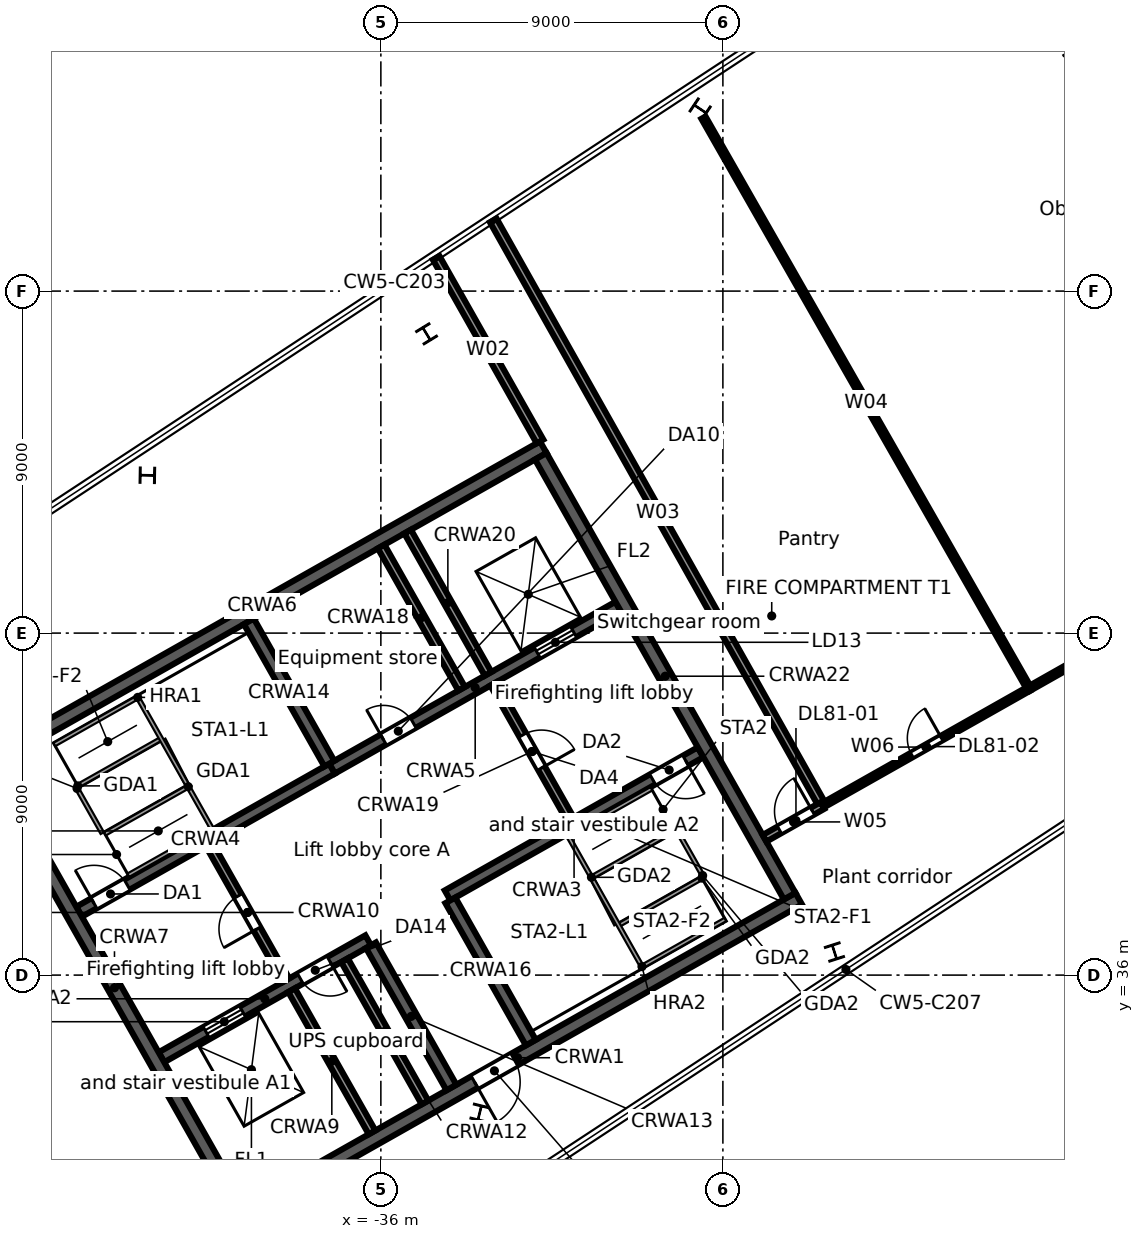
"""IFC4 building model, lengths in metres.
Left out: names, types, materials, properties, quantities, classifications, styles, units other than length and angle.
Written with IfcOpenShell. Run it as: python <this file> out.ifc"""

import sys

from ifc_helpers import new_model, si_unit, direction, frame, frame_2d, origin, origin_2d, place, context, subcontext, project, spatial, rectangle, i_section, extrude, element, fill, save


model = new_model("IFC4")
c1 = context("Model", 3, precision=1e-05, world=origin(), true_north=direction((0.0, 1.0)))
c2 = subcontext(c1, "Body", "Model", "MODEL_VIEW")
j1 = project(units=[si_unit("LENGTHUNIT", "METRE"), si_unit("PLANEANGLEUNIT", "RADIAN")], contexts=[c1])
p1 = place(None, origin())
s1 = spatial("IfcSite", under=j1, at=p1, CompositionType="ELEMENT")
p2 = place(p1, origin())
s2 = spatial("IfcBuilding", under=s1, at=p2, CompositionType="ELEMENT")
p3 = place(p2, frame((0.0, 0.0, 357.7)))
s3 = spatial("IfcBuildingStorey", under=s2, at=p3, CompositionType="ELEMENT", Elevation=357.7)
for number, where, z_axis, x_axis in (
    (1, (-17.957, 60.462, 0.0), (0.0, 0.0, 1.0), (0.87, 0.492, 0.0)),
    (2, (-27.598, 58.793, 0.0), (0.0, 0.0, 1.0), (0.558, 0.83, 0.0)),
    (3, (-34.798, 52.875, 0.0), (0.0, 0.0, 1.0), (0.853, 0.521, 0.0)),
):
    element("IfcColumn", number, at=place(p3, frame(where, z_axis=z_axis, x_axis=x_axis)), inside=s3, PredefinedType="COLUMN", context=c2, shape_type="SweptSolid", body=[
        extrude(i_section(OverallWidth=0.4, OverallDepth=0.4, WebThickness=0.013, FlangeThickness=0.021, FilletRadius=0.022, at=origin_2d()), origin(), (0.0, 0.0, 1.0), 3.3),
    ])
p4 = place(p3, frame((-42.144, 49.153, 0.0), z_axis=(0.0, 0.0, 1.0), x_axis=(0.017539659542, 0.999846168339, 0.0)))
e4 = element("IfcColumn", 4, at=p4, inside=s3, PredefinedType="COLUMN", context=c2, shape_type="SweptSolid", body=[
    extrude(i_section(OverallWidth=0.4, OverallDepth=0.4, WebThickness=0.013, FlangeThickness=0.021, FilletRadius=0.022, at=origin_2d()), origin(), (0.0, 0.0, 1.0), 3.6),
])
for number, where, z_axis, x_axis in (
    (5, (-33.4, 32.374, 0.0), (0.0, 0.0, 1.0), (-0.971, 0.239, 0.0)),
    (6, (-24.065, 36.607, 0.0), (0.0, 0.0, 1.0), (-0.952, -0.307, 0.0)),
):
    element("IfcColumn", number, at=place(p3, frame(where, z_axis=z_axis, x_axis=x_axis)), inside=s3, PredefinedType="COLUMN", context=c2, shape_type="SweptSolid", body=[
        extrude(i_section(OverallWidth=0.4, OverallDepth=0.4, WebThickness=0.013, FlangeThickness=0.021, FilletRadius=0.022, at=origin_2d()), origin(), (0.0, 0.0, 1.0), 3.3),
    ])
p5 = place(p3, frame((-44.119, 26.51, 0.0), z_axis=(0.0, 0.0, 1.0), x_axis=(-0.857172484352, 0.515029447769, 0.0)))
e7 = element("IfcWall", 7, at=p5, inside=s3, PredefinedType="STANDARD", context=c2, shape_type="SweptSolid", body=[
    extrude(rectangle(XDim=17.084, YDim=0.2, at=frame_2d((8.542, 0.0))), origin(), (0.0, 0.0, 1.0), 3.3),
])
p6 = place(p3, frame((-39.801, 29.64, 0.0), z_axis=(0.0, 0.0, 1.0), x_axis=(0.870359753402, 0.492416388494, 0.0)))
e8 = element("IfcWall", 8, at=p6, inside=s3, PredefinedType="SOLIDWALL", context=c2, shape_type="SweptSolid", body=[
    extrude(rectangle(XDim=17.0, YDim=0.35, at=frame_2d((8.5, 0.0))), origin(), (0.0, 0.0, 1.0), 3.3),
])
p7 = place(p6, frame((7.2, 0.0, 0.0)))
e9 = element("IfcOpeningElement", 9, at=p7, cuts=e8, PredefinedType="OPENING", context=c2, shape_type="SweptSolid", body=[
    extrude(rectangle(XDim=1.2, YDim=2.1, at=frame_2d((0.6, 1.05))), frame((0.0, 0.185, 0.0), z_axis=(0.0, -1.0, 0.0), x_axis=(1.0, 0.0, 0.0)), (0.0, 0.0, 1.0), 0.37),
])
p8 = place(p3, frame((-41.774, 33.838, 0.0), z_axis=(0.0, 0.0, 1.0), x_axis=(0.870355415866, 0.492424055132, 0.0)))
e10 = element("IfcWall", 10, at=p8, inside=s3, PredefinedType="SOLIDWALL", context=c2, shape_type="SweptSolid", body=[
    extrude(rectangle(XDim=6.25, YDim=0.3, at=frame_2d((3.125, 0.0))), origin(), (0.0, 0.0, 1.0), 3.3),
])
p9 = place(p8, frame((1.35, 0.0, 0.0)))
e11 = element("IfcOpeningElement", 11, at=p9, cuts=e10, PredefinedType="OPENING", context=c2, shape_type="SweptSolid", body=[
    extrude(rectangle(XDim=1.1, YDim=2.1, at=frame_2d((0.55, 1.05))), frame((0.0, 0.16, 0.0), z_axis=(0.0, -1.0, 0.0), x_axis=(1.0, 0.0, 0.0)), (0.0, 0.0, 1.0), 0.32),
])
p10 = place(p8, frame((4.2, 0.0, 0.0)))
e12 = element("IfcOpeningElement", 12, at=p10, cuts=e10, PredefinedType="OPENING", context=c2, shape_type="SweptSolid", body=[
    extrude(rectangle(XDim=0.9, YDim=2.1, at=frame_2d((0.45, 1.05))), frame((0.0, 0.16, 0.0), z_axis=(0.0, -1.0, 0.0), x_axis=(1.0, 0.0, 0.0)), (0.0, 0.0, 1.0), 0.32),
])
p11 = place(p3, frame((-34.245, 38.097, 0.0), z_axis=(0.0, 0.0, 1.0), x_axis=(0.870352347706, 0.49242947804, 0.0)))
e13 = element("IfcWall", 13, at=p11, inside=s3, PredefinedType="SOLIDWALL", context=c2, shape_type="SweptSolid", body=[
    extrude(rectangle(XDim=7.65, YDim=0.3, at=frame_2d((3.825, 0.0))), origin(), (0.0, 0.0, 1.0), 3.3),
])
p12 = place(p11, frame((6.2, 0.0, 0.0)))
e14 = element("IfcOpeningElement", 14, at=p12, cuts=e13, PredefinedType="OPENING", context=c2, shape_type="SweptSolid", body=[
    extrude(rectangle(XDim=1.0, YDim=2.1, at=frame_2d((0.5, 1.05))), frame((0.0, 0.16, 0.0), z_axis=(0.0, -1.0, 0.0), x_axis=(1.0, 0.0, 0.0)), (0.0, 0.0, 1.0), 0.32),
])
p13 = place(p3, frame((-43.94, 37.667, 0.0), z_axis=(0.0, 0.0, 1.0), x_axis=(0.870352347706, 0.49242947804, 0.0)))
e15 = element("IfcWall", 15, at=p13, inside=s3, PredefinedType="SOLIDWALL", context=c2, shape_type="SweptSolid", body=[
    extrude(rectangle(XDim=7.65, YDim=0.3, at=frame_2d((3.825, 0.0))), origin(), (0.0, 0.0, 1.0), 3.3),
])
p14 = place(p13, frame((0.45, 0.0, 0.0)))
e16 = element("IfcOpeningElement", 16, at=p14, cuts=e15, PredefinedType="OPENING", context=c2, shape_type="SweptSolid", body=[
    extrude(rectangle(XDim=1.0, YDim=2.1, at=frame_2d((0.5, 1.05))), frame((0.0, 0.16, 0.0), z_axis=(0.0, -1.0, 0.0), x_axis=(1.0, 0.0, 0.0)), (0.0, 0.0, 1.0), 0.32),
])
p15 = place(p3, frame((-37.282, 41.435, 0.0), z_axis=(0.0, 0.0, 1.0), x_axis=(0.870364588774, 0.492407841741, 0.0)))
e17 = element("IfcWall", 17, at=p15, inside=s3, PredefinedType="SOLIDWALL", context=c2, shape_type="SweptSolid", body=[
    extrude(rectangle(XDim=8.65, YDim=0.3, at=frame_2d((4.325, 0.0))), origin(), (0.0, 0.0, 1.0), 3.3),
])
p16 = place(p15, frame((6.2, 0.0, 0.0)))
e18 = element("IfcOpeningElement", 18, at=p16, cuts=e17, PredefinedType="OPENING", context=c2, shape_type="SweptSolid", body=[
    extrude(rectangle(XDim=1.1, YDim=2.1, at=frame_2d((0.55, 1.05))), frame((0.0, 0.16, 0.0), z_axis=(0.0, -1.0, 0.0), x_axis=(1.0, 0.0, 0.0)), (0.0, 0.0, 1.0), 0.32),
])
p17 = place(p15, frame((1.55, 0.0, 0.0)))
e19 = element("IfcOpeningElement", 19, at=p17, cuts=e17, PredefinedType="OPENING", context=c2, shape_type="SweptSolid", body=[
    extrude(rectangle(XDim=0.9, YDim=2.1, at=frame_2d((0.45, 1.05))), frame((0.0, 0.16, 0.0), z_axis=(0.0, -1.0, 0.0), x_axis=(1.0, 0.0, 0.0)), (0.0, 0.0, 1.0), 0.32),
])
p18 = place(p3, frame((-46.522, 41.521, 0.0), z_axis=(0.0, 0.0, 1.0), x_axis=(0.870359753402, 0.492416388494, 0.0)))
e20 = element("IfcWall", 20, at=p18, inside=s3, PredefinedType="SOLIDWALL", context=c2, shape_type="SweptSolid", body=[
    extrude(rectangle(XDim=17.0, YDim=0.35, at=frame_2d((8.5, 0.0))), origin(), (0.0, 0.0, 1.0), 3.3),
])
p19 = place(p3, frame((-46.284, 41.454, 0.0), z_axis=(0.0, 0.0, 1.0), x_axis=(0.492429810477, -0.870352159619, 0.0)))
e21 = element("IfcWall", 21, at=p19, inside=s3, PredefinedType="SOLIDWALL", context=c2, shape_type="SweptSolid", body=[
    extrude(rectangle(XDim=13.3, YDim=0.35, at=frame_2d((6.65, 0.0))), origin(), (0.0, 0.0, 1.0), 3.3),
])
p20 = place(p3, frame((-38.349, 35.603, 0.0), z_axis=(0.0, 0.0, 1.0), x_axis=(0.492410799949, -0.870362915164, 0.0)))
e22 = element("IfcWall", 22, at=p20, inside=s3, PredefinedType="SOLIDWALL", context=c2, shape_type="SweptSolid", body=[
    extrude(rectangle(XDim=4.3, YDim=0.2, at=frame_2d((2.15, 0.0))), origin(), (0.0, 0.0, 1.0), 3.3),
])
p21 = place(p3, frame((-40.516, 39.433, 0.0), z_axis=(0.0, 0.0, 1.0), x_axis=(0.492453559952, -0.87033872216, 0.0)))
e23 = element("IfcWall", 23, at=p21, inside=s3, PredefinedType="PARTITIONING", context=c2, shape_type="SweptSolid", body=[
    extrude(rectangle(XDim=4.1, YDim=0.2, at=frame_2d((2.05, 0.0))), origin(), (0.0, 0.0, 1.0), 3.3),
])
p22 = place(p21, frame((1.55, 0.0, 0.0)))
e24 = element("IfcOpeningElement", 24, at=p22, cuts=e23, PredefinedType="OPENING", context=c2, shape_type="SweptSolid", body=[
    extrude(rectangle(XDim=1.0, YDim=2.1, at=frame_2d((0.5, 1.05))), frame((0.0, 0.11, 0.0), z_axis=(0.0, -1.0, 0.0), x_axis=(1.0, 0.0, 0.0)), (0.0, 0.0, 1.0), 0.22),
])
p23 = place(p3, frame((-36.956, 36.391, 0.0), z_axis=(0.0, 0.0, 1.0), x_axis=(0.492410799949, -0.870362915164, 0.0)))
e25 = element("IfcWall", 25, at=p23, inside=s3, PredefinedType="SOLIDWALL", context=c2, shape_type="SweptSolid", body=[
    extrude(rectangle(XDim=4.3, YDim=0.2, at=frame_2d((2.15, 0.0))), origin(), (0.0, 0.0, 1.0), 3.3),
])
p24 = place(p3, frame((-36.26, 36.785, 0.0), z_axis=(0.0, 0.0, 1.0), x_axis=(0.492435133428, -0.870349147967, 0.0)))
e26 = element("IfcWall", 26, at=p24, inside=s3, PredefinedType="SOLIDWALL", context=c2, shape_type="SweptSolid", body=[
    extrude(rectangle(XDim=4.3, YDim=0.3, at=frame_2d((2.15, 0.0))), origin(), (0.0, 0.0, 1.0), 3.3),
])
p25 = place(p3, frame((-39.473, 45.308, 0.0), z_axis=(0.0, 0.0, 1.0), x_axis=(0.492410799949, -0.870362915164, 0.0)))
e27 = element("IfcWall", 27, at=p25, inside=s3, PredefinedType="SOLIDWALL", context=c2, shape_type="SweptSolid", body=[
    extrude(rectangle(XDim=4.3, YDim=0.3, at=frame_2d((2.15, 0.0))), origin(), (0.0, 0.0, 1.0), 3.3),
])
p26 = place(p3, frame((-34.171, 37.967, 0.0), z_axis=(0.0, 0.0, 1.0), x_axis=(0.492435133428, -0.870349147967, 0.0)))
e28 = element("IfcWall", 28, at=p26, inside=s3, PredefinedType="SOLIDWALL", context=c2, shape_type="SweptSolid", body=[
    extrude(rectangle(XDim=4.3, YDim=0.3, at=frame_2d((2.15, 0.0))), origin(), (0.0, 0.0, 1.0), 3.3),
])
p27 = place(p3, frame((-35.992, 47.277, 0.0), z_axis=(0.0, 0.0, 1.0), x_axis=(0.492410799949, -0.870362915164, 0.0)))
e29 = element("IfcWall", 29, at=p27, inside=s3, PredefinedType="SOLIDWALL", context=c2, shape_type="SweptSolid", body=[
    extrude(rectangle(XDim=4.3, YDim=0.2, at=frame_2d((2.15, 0.0))), origin(), (0.0, 0.0, 1.0), 3.3),
])
p28 = place(p3, frame((-33.031, 43.667, 0.0), z_axis=(0.0, 0.0, 1.0), x_axis=(0.492408451753, -0.87036424366, 0.0)))
e30 = element("IfcWall", 30, at=p28, inside=s3, PredefinedType="PARTITIONING", context=c2, shape_type="SweptSolid", body=[
    extrude(rectangle(XDim=4.1, YDim=0.2, at=frame_2d((2.05, 0.0))), origin(), (0.0, 0.0, 1.0), 3.3),
])
p29 = place(p28, frame((1.55, 0.0, 0.0)))
e31 = element("IfcOpeningElement", 31, at=p29, cuts=e30, PredefinedType="OPENING", context=c2, shape_type="SweptSolid", body=[
    extrude(rectangle(XDim=1.0, YDim=2.1, at=frame_2d((0.5, 1.05))), frame((0.0, 0.11, 0.0), z_axis=(0.0, -1.0, 0.0), x_axis=(1.0, 0.0, 0.0)), (0.0, 0.0, 1.0), 0.22),
])
p30 = place(p3, frame((-35.296, 47.671, 0.0), z_axis=(0.0, 0.0, 1.0), x_axis=(0.492435133428, -0.870349147967, 0.0)))
e32 = element("IfcWall", 32, at=p30, inside=s3, PredefinedType="SOLIDWALL", context=c2, shape_type="SweptSolid", body=[
    extrude(rectangle(XDim=4.3, YDim=0.2, at=frame_2d((2.15, 0.0))), origin(), (0.0, 0.0, 1.0), 3.3),
])
p31 = place(p3, frame((-31.792, 49.653, 0.0), z_axis=(0.0, 0.0, 1.0), x_axis=(0.492421943245, -0.870356610712, 0.0)))
e33 = element("IfcWall", 33, at=p31, inside=s3, PredefinedType="SOLIDWALL", context=c2, shape_type="SweptSolid", body=[
    extrude(rectangle(XDim=13.3, YDim=0.35, at=frame_2d((6.65, 0.0))), origin(), (0.0, 0.0, 1.0), 3.3),
])
p32 = place(p3, frame((-34.544, 54.873, 0.0), z_axis=(0.0, 0.0, 1.0), x_axis=(0.492390708412, -0.870374281714, 0.0)))
e34 = element("IfcWall", 34, at=p32, inside=s3, PredefinedType="PARTITIONING", context=c2, shape_type="SweptSolid", body=[
    extrude(rectangle(XDim=5.548, YDim=0.2, at=frame_2d((2.774, 0.0))), origin(), (0.0, 0.0, 1.0), 2.18),
])
p33 = place(p3, frame((-33.042, 55.86, 0.0), z_axis=(0.0, 0.0, 1.0), x_axis=(0.490288138745, -0.871560405828, 0.0)))
e35 = element("IfcWall", 35, at=p33, inside=s3, PredefinedType="PARTITIONING", context=c2, shape_type="SweptSolid", body=[
    extrude(rectangle(XDim=17.667, YDim=0.2, at=frame_2d((8.834, 0.0))), origin(), (0.0, 0.0, 1.0), 2.18),
])
p34 = place(p3, frame((-27.511, 58.564, 0.0), z_axis=(0.0, 0.0, 1.0), x_axis=(0.495459338806, -0.868631132063, 0.0)))
e36 = element("IfcWall", 36, at=p34, inside=s3, PredefinedType="PARTITIONING", context=c2, shape_type="SweptSolid", body=[
    extrude(rectangle(XDim=17.297, YDim=0.125, at=frame_2d((8.648, 0.0))), origin(), (0.0, 0.0, 1.0), 3.3),
])
p35 = place(p3, frame((-25.904, 39.6, 0.0), z_axis=(0.0, 0.0, 1.0), x_axis=(0.870482323294, 0.492199679838, 0.0)))
e37 = element("IfcWall", 37, at=p35, inside=s3, PredefinedType="PARTITIONING", context=c2, shape_type="SweptSolid", body=[
    extrude(rectangle(XDim=1.751, YDim=0.2, at=frame_2d((0.875, 0.0))), origin(), (0.0, 0.0, 1.0), 3.3),
])
p36 = place(p35, frame((0.45, 0.0, 0.0)))
e38 = element("IfcOpeningElement", 38, at=p36, cuts=e37, PredefinedType="OPENING", context=c2, shape_type="SweptSolid", body=[
    extrude(rectangle(XDim=1.0, YDim=2.1, at=frame_2d((0.5, 1.05))), frame((0.0, 0.11, 0.0), z_axis=(0.0, -1.0, 0.0), x_axis=(1.0, 0.0, 0.0)), (0.0, 0.0, 1.0), 0.22),
])
p37 = place(p3, frame((-24.38, 40.462, 0.0), z_axis=(0.0, 0.0, 1.0), x_axis=(0.87036048388, 0.492415097353, 0.0)))
e39 = element("IfcWall", 39, at=p37, inside=s3, PredefinedType="PARTITIONING", context=c2, shape_type="SweptSolid", body=[
    extrude(rectangle(XDim=6.249, YDim=0.125, at=frame_2d((3.125, 0.0))), origin(), (0.0, 0.0, 1.0), 3.3),
])
p38 = place(p37, frame((2.7, 0.0, 0.0)))
e40 = element("IfcOpeningElement", 40, at=p38, cuts=e39, PredefinedType="OPENING", context=c2, shape_type="SweptSolid", body=[
    extrude(rectangle(XDim=0.9, YDim=2.1, at=frame_2d((0.45, 1.05))), frame((0.0, 0.073, 0.0), z_axis=(0.0, -1.0, 0.0), x_axis=(1.0, 0.0, 0.0)), (0.0, 0.0, 1.0), 0.145),
])
p39 = place(p3, frame((-18.941, 43.539, 0.0), z_axis=(0.0, 0.0, 1.0), x_axis=(0.870355301806, 0.492424256733, 0.0)))
e41 = element("IfcWall", 41, at=p39, inside=s3, PredefinedType="PARTITIONING", context=c2, shape_type="SweptSolid", body=[
    extrude(rectangle(XDim=13.216, YDim=0.125, at=frame_2d((6.608, 0.0))), origin(), (0.0, 0.0, 1.0), 2.68),
])
p40 = place(p39, frame((5.7, 0.0, 0.0)))
e42 = element("IfcOpeningElement", 42, at=p40, cuts=e41, PredefinedType="OPENING", context=c2, shape_type="SweptSolid", body=[
    extrude(rectangle(XDim=1.8, YDim=2.1, at=frame_2d((0.9, 1.05))), frame((0.0, 0.073, 0.0), z_axis=(0.0, -1.0, 0.0), x_axis=(1.0, 0.0, 0.0)), (0.0, 0.0, 1.0), 0.145),
])
p41 = place(p16, origin())
e43 = element("IfcDoor", 43, at=p41, inside=s3, OperationType="DOUBLE_DOOR_SLIDING", PredefinedType="DOOR", context=c2, shape_type="SweptSolid", body=[
    extrude(rectangle(XDim=1.1, YDim=2.1, at=frame_2d((0.55, 1.05))), frame((0.0, 0.025, 0.0), z_axis=(0.0, -1.0, 0.0), x_axis=(1.0, 0.0, 0.0)), (0.0, 0.0, 1.0), 0.05),
])
fill(e18, e43)
p42 = place(p9, origin())
e44 = element("IfcDoor", 44, at=p42, inside=s3, OperationType="DOUBLE_DOOR_SLIDING", PredefinedType="DOOR", context=c2, shape_type="SweptSolid", body=[
    extrude(rectangle(XDim=1.1, YDim=2.1, at=frame_2d((0.55, 1.05))), frame((0.0, 0.025, 0.0), z_axis=(0.0, -1.0, 0.0), x_axis=(1.0, 0.0, 0.0)), (0.0, 0.0, 1.0), 0.05),
])
fill(e11, e44)
p43 = place(p14, origin())
e45 = element("IfcDoor", 45, at=p43, inside=s3, OperationType="SINGLE_SWING_LEFT", PredefinedType="DOOR", context=c2, shape_type="SweptSolid", body=[
    extrude(rectangle(XDim=1.0, YDim=2.1, at=frame_2d((0.5, 1.05))), frame((0.0, 0.025, 0.0), z_axis=(0.0, -1.0, 0.0), x_axis=(1.0, 0.0, 0.0)), (0.0, 0.0, 1.0), 0.05),
])
fill(e16, e45)
p44 = place(p12, frame((1.0, 0.0, 0.0), z_axis=(0.0, 0.0, 1.0), x_axis=(-1.0, 0.0, 0.0)))
e46 = element("IfcDoor", 46, at=p44, inside=s3, OperationType="SINGLE_SWING_LEFT", PredefinedType="DOOR", context=c2, shape_type="SweptSolid", body=[
    extrude(rectangle(XDim=1.0, YDim=2.1, at=frame_2d((0.5, 1.05))), frame((0.0, 0.025, 0.0), z_axis=(0.0, -1.0, 0.0), x_axis=(1.0, 0.0, 0.0)), (0.0, 0.0, 1.0), 0.05),
])
fill(e14, e46)
p45 = place(p22, frame((1.0, 0.0, 0.0), z_axis=(0.0, 0.0, 1.0), x_axis=(-1.0, 0.0, 0.0)))
e47 = element("IfcDoor", 47, at=p45, inside=s3, OperationType="SINGLE_SWING_LEFT", PredefinedType="DOOR", context=c2, shape_type="SweptSolid", body=[
    extrude(rectangle(XDim=1.0, YDim=2.1, at=frame_2d((0.5, 1.05))), frame((0.0, 0.025, 0.0), z_axis=(0.0, -1.0, 0.0), x_axis=(1.0, 0.0, 0.0)), (0.0, 0.0, 1.0), 0.05),
])
fill(e24, e47)
p46 = place(p29, origin())
e48 = element("IfcDoor", 48, at=p46, inside=s3, OperationType="SINGLE_SWING_RIGHT", PredefinedType="DOOR", context=c2, shape_type="SweptSolid", body=[
    extrude(rectangle(XDim=1.0, YDim=2.1, at=frame_2d((0.5, 1.05))), frame((0.0, 0.025, 0.0), z_axis=(0.0, -1.0, 0.0), x_axis=(1.0, 0.0, 0.0)), (0.0, 0.0, 1.0), 0.05),
])
fill(e31, e48)
p47 = place(p7, frame((1.2, 0.0, 0.0), z_axis=(0.0, 0.0, 1.0), x_axis=(-1.0, 0.0, 0.0)))
e49 = element("IfcDoor", 49, at=p47, inside=s3, OperationType="SINGLE_SWING_RIGHT", PredefinedType="DOOR", context=c2, shape_type="SweptSolid", body=[
    extrude(rectangle(XDim=1.2, YDim=2.1, at=frame_2d((0.6, 1.05))), frame((0.0, 0.025, 0.0), z_axis=(0.0, -1.0, 0.0), x_axis=(1.0, 0.0, 0.0)), (0.0, 0.0, 1.0), 0.05),
])
fill(e9, e49)
p48 = place(p17, origin())
e50 = element("IfcDoor", 50, at=p48, inside=s3, OperationType="SINGLE_SWING_LEFT", PredefinedType="DOOR", context=c2, shape_type="SweptSolid", body=[
    extrude(rectangle(XDim=0.9, YDim=2.1, at=frame_2d((0.45, 1.05))), frame((0.0, 0.025, 0.0), z_axis=(0.0, -1.0, 0.0), x_axis=(1.0, 0.0, 0.0)), (0.0, 0.0, 1.0), 0.05),
])
fill(e19, e50)
p49 = place(p10, frame((0.9, 0.0, 0.0), z_axis=(0.0, 0.0, 1.0), x_axis=(-1.0, 0.0, 0.0)))
e51 = element("IfcDoor", 51, at=p49, inside=s3, OperationType="SINGLE_SWING_LEFT", PredefinedType="DOOR", context=c2, shape_type="SweptSolid", body=[
    extrude(rectangle(XDim=0.9, YDim=2.1, at=frame_2d((0.45, 1.05))), frame((0.0, 0.025, 0.0), z_axis=(0.0, -1.0, 0.0), x_axis=(1.0, 0.0, 0.0)), (0.0, 0.0, 1.0), 0.05),
])
fill(e12, e51)
p50 = place(p36, origin())
e52 = element("IfcDoor", 52, at=p50, inside=s3, OperationType="SINGLE_SWING_RIGHT", PredefinedType="DOOR", context=c2, shape_type="SweptSolid", body=[
    extrude(rectangle(XDim=1.0, YDim=2.1, at=frame_2d((0.5, 1.05))), frame((0.0, 0.025, 0.0), z_axis=(0.0, -1.0, 0.0), x_axis=(1.0, 0.0, 0.0)), (0.0, 0.0, 1.0), 0.05),
])
fill(e38, e52)
p51 = place(p38, origin())
e53 = element("IfcDoor", 53, at=p51, inside=s3, OperationType="SINGLE_SWING_RIGHT", PredefinedType="DOOR", context=c2, shape_type="SweptSolid", body=[
    extrude(rectangle(XDim=0.9, YDim=2.1, at=frame_2d((0.45, 1.05))), frame((0.0, 0.025, 0.0), z_axis=(0.0, -1.0, 0.0), x_axis=(1.0, 0.0, 0.0)), (0.0, 0.0, 1.0), 0.05),
])
fill(e40, e53)
save(model, sys.argv[1])
